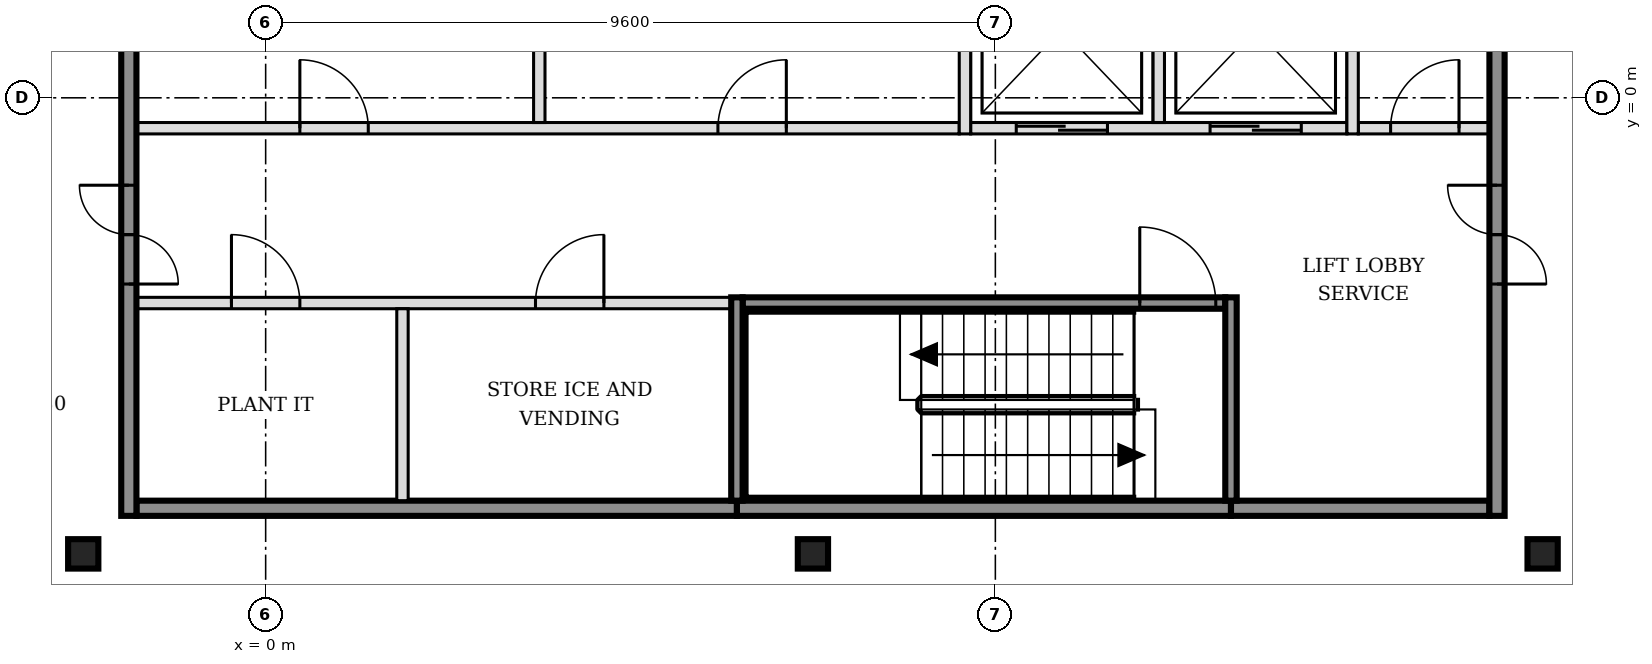
"""IFC4 building model, lengths in metres.
Left out: names, types, materials, properties, quantities, classifications, styles, units other than length and angle.
Written with IfcOpenShell. Run it as: python <this file> out.ifc"""

import sys

from ifc_helpers import new_model, si_unit, direction, frame, frame_2d, origin, origin_2d, place, context, subcontext, project, spatial, rectangle, i_section, extrude, element, fill, save


model = new_model("IFC4")
c1 = context("Model", 3, precision=1e-05, world=origin(), true_north=direction((0.0, 1.0)))
c2 = subcontext(c1, "Body", "Model", "MODEL_VIEW")
j1 = project(units=[si_unit("LENGTHUNIT", "METRE"), si_unit("PLANEANGLEUNIT", "RADIAN")], contexts=[c1])
p1 = place(None, origin())
s1 = spatial("IfcSite", under=j1, at=p1, CompositionType="ELEMENT")
p2 = place(p1, origin())
s2 = spatial("IfcBuilding", under=s1, at=p2, CompositionType="ELEMENT")
p3 = place(p2, frame((0.0, 0.0, 253.8)))
s3 = spatial("IfcBuildingStorey", under=s2, at=p3, CompositionType="ELEMENT", Elevation=253.8)
for number, where, z_axis, x_axis in (
    (1, (-2.4, -6.0, -0.15), (0.0, 0.0, 1.0), (1.0, 0.0, 0.0)),
    (2, (7.2, -6.0, -0.15), (0.0, 0.0, 1.0), (1.0, 0.0, 0.0)),
    (3, (16.8, -6.0, -0.15), (0.0, 0.0, 1.0), (1.0, 0.0, 0.0)),
):
    element("IfcColumn", number, at=place(p3, frame(where, z_axis=z_axis, x_axis=x_axis)), inside=s3, PredefinedType="COLUMN", context=c2, shape_type="SweptSolid", body=[
        extrude(i_section(OverallWidth=0.398, OverallDepth=0.387, WebThickness=0.021, FlangeThickness=0.033, FilletRadius=0.015, at=origin_2d()), origin(), (0.0, 0.0, 1.0), 3.6),
    ])
p4 = place(p3, frame((-1.7, -5.4, 0.0), z_axis=(0.0, 0.0, 1.0), x_axis=(1.0, 0.0, 0.0)))
e4 = element("IfcWall", 4, at=p4, inside=s3, PredefinedType="SOLIDWALL", context=c2, shape_type="SweptSolid", body=[
    extrude(rectangle(XDim=7.9, YDim=0.2, at=frame_2d((3.95, 0.0))), origin(), (0.0, 0.0, 1.0), 3.45),
])
p5 = place(p3, frame((6.2, -5.4, 0.0), z_axis=(0.0, 0.0, 1.0), x_axis=(1.0, 0.0, 0.0)))
e5 = element("IfcWall", 5, at=p5, inside=s3, PredefinedType="SOLIDWALL", context=c2, shape_type="SweptSolid", body=[
    extrude(rectangle(XDim=6.5, YDim=0.2, at=frame_2d((3.25, 0.0))), origin(), (0.0, 0.0, 1.0), 3.45),
])
p6 = place(p3, frame((12.7, -5.4, 0.0), z_axis=(0.0, 0.0, 1.0), x_axis=(1.0, 0.0, 0.0)))
e6 = element("IfcWall", 6, at=p6, inside=s3, PredefinedType="SOLIDWALL", context=c2, shape_type="SweptSolid", body=[
    extrude(rectangle(XDim=3.4, YDim=0.2, at=frame_2d((1.7, 0.0))), origin(), (0.0, 0.0, 1.0), 3.45),
])
p7 = place(p3, frame((-1.7, -2.7, 0.0), z_axis=(0.0, 0.0, 1.0), x_axis=(1.0, 0.0, 0.0)))
e7 = element("IfcWall", 7, at=p7, inside=s3, PredefinedType="PARTITIONING", context=c2, shape_type="SweptSolid", body=[
    extrude(rectangle(XDim=7.825, YDim=0.15, at=frame_2d((3.913, 0.0))), origin(), (0.0, 0.0, 1.0), 3.45),
])
p8 = place(p7, frame((1.25, 0.0, 0.0)))
e8 = element("IfcOpeningElement", 8, at=p8, cuts=e7, PredefinedType="OPENING", context=c2, shape_type="SweptSolid", body=[
    extrude(rectangle(XDim=0.9, YDim=2.1, at=frame_2d((0.45, 1.05))), frame((0.0, 0.085, 0.0), z_axis=(0.0, -1.0, 0.0), x_axis=(1.0, 0.0, 0.0)), (0.0, 0.0, 1.0), 0.17),
])
p9 = place(p7, frame((5.25, 0.0, 0.0)))
e9 = element("IfcOpeningElement", 9, at=p9, cuts=e7, PredefinedType="OPENING", context=c2, shape_type="SweptSolid", body=[
    extrude(rectangle(XDim=0.9, YDim=2.1, at=frame_2d((0.45, 1.05))), frame((0.0, 0.085, 0.0), z_axis=(0.0, -1.0, 0.0), x_axis=(1.0, 0.0, 0.0)), (0.0, 0.0, 1.0), 0.17),
])
p10 = place(p3, frame((6.275, -2.7, 0.0), z_axis=(0.0, 0.0, 1.0), x_axis=(1.0, 0.0, 0.0)))
e10 = element("IfcWall", 10, at=p10, inside=s3, PredefinedType="SOLIDWALL", context=c2, shape_type="SweptSolid", body=[
    extrude(rectangle(XDim=6.35, YDim=0.15, at=frame_2d((3.175, 0.0))), origin(), (0.0, 0.0, 1.0), 3.45),
])
p11 = place(p10, frame((5.225, 0.0, 0.0)))
e11 = element("IfcOpeningElement", 11, at=p11, cuts=e10, PredefinedType="OPENING", context=c2, shape_type="SweptSolid", body=[
    extrude(rectangle(XDim=1.0, YDim=2.1, at=frame_2d((0.5, 1.05))), frame((0.0, 0.085, 0.0), z_axis=(0.0, -1.0, 0.0), x_axis=(1.0, 0.0, 0.0)), (0.0, 0.0, 1.0), 0.17),
])
p12 = place(p3, frame((-1.7, -0.4, 0.0), z_axis=(0.0, 0.0, 1.0), x_axis=(1.0, 0.0, 0.0)))
e12 = element("IfcWall", 12, at=p12, inside=s3, PredefinedType="PARTITIONING", context=c2, shape_type="SweptSolid", body=[
    extrude(rectangle(XDim=10.825, YDim=0.15, at=frame_2d((5.413, 0.0))), origin(), (0.0, 0.0, 1.0), 3.45),
])
p13 = place(p12, frame((2.15, 0.0, 0.0)))
e13 = element("IfcOpeningElement", 13, at=p13, cuts=e12, PredefinedType="OPENING", context=c2, shape_type="SweptSolid", body=[
    extrude(rectangle(XDim=0.9, YDim=2.1, at=frame_2d((0.45, 1.05))), frame((0.0, 0.085, 0.0), z_axis=(0.0, -1.0, 0.0), x_axis=(1.0, 0.0, 0.0)), (0.0, 0.0, 1.0), 0.17),
])
p14 = place(p12, frame((7.65, 0.0, 0.0)))
e14 = element("IfcOpeningElement", 14, at=p14, cuts=e12, PredefinedType="OPENING", context=c2, shape_type="SweptSolid", body=[
    extrude(rectangle(XDim=0.9, YDim=2.1, at=frame_2d((0.45, 1.05))), frame((0.0, 0.085, 0.0), z_axis=(0.0, -1.0, 0.0), x_axis=(1.0, 0.0, 0.0)), (0.0, 0.0, 1.0), 0.17),
])
p15 = place(p3, frame((9.275, -0.4, 0.0), z_axis=(0.0, 0.0, 1.0), x_axis=(1.0, 0.0, 0.0)))
e15 = element("IfcWall", 15, at=p15, inside=s3, PredefinedType="SOLIDWALL", context=c2, shape_type="SweptSolid", body=[
    extrude(rectangle(XDim=4.95, YDim=0.15, at=frame_2d((2.475, 0.0))), origin(), (0.0, 0.0, 1.0), 3.45),
])
p16 = place(p15, frame((0.6, 0.0, 0.0)))
e16 = element("IfcOpeningElement", 16, at=p16, cuts=e15, PredefinedType="OPENING", context=c2, shape_type="SweptSolid", body=[
    extrude(rectangle(XDim=1.2, YDim=2.1, at=frame_2d((0.6, 1.05))), frame((0.0, 0.085, 0.0), z_axis=(0.0, -1.0, 0.0), x_axis=(1.0, 0.0, 0.0)), (0.0, 0.0, 1.0), 0.17),
])
p17 = place(p15, frame((3.15, 0.0, 0.0)))
e17 = element("IfcOpeningElement", 17, at=p17, cuts=e15, PredefinedType="OPENING", context=c2, shape_type="SweptSolid", body=[
    extrude(rectangle(XDim=1.2, YDim=2.1, at=frame_2d((0.6, 1.05))), frame((0.0, 0.085, 0.0), z_axis=(0.0, -1.0, 0.0), x_axis=(1.0, 0.0, 0.0)), (0.0, 0.0, 1.0), 0.17),
])
p18 = place(p3, frame((14.375, -0.4, 0.0), z_axis=(0.0, 0.0, 1.0), x_axis=(1.0, 0.0, 0.0)))
e18 = element("IfcWall", 18, at=p18, inside=s3, PredefinedType="PARTITIONING", context=c2, shape_type="SweptSolid", body=[
    extrude(rectangle(XDim=1.725, YDim=0.15, at=frame_2d((0.863, 0.0))), origin(), (0.0, 0.0, 1.0), 3.45),
])
p19 = place(p18, frame((0.425, 0.0, 0.0)))
e19 = element("IfcOpeningElement", 19, at=p19, cuts=e18, PredefinedType="OPENING", context=c2, shape_type="SweptSolid", body=[
    extrude(rectangle(XDim=0.9, YDim=2.1, at=frame_2d((0.45, 1.05))), frame((0.0, 0.085, 0.0), z_axis=(0.0, -1.0, 0.0), x_axis=(1.0, 0.0, 0.0)), (0.0, 0.0, 1.0), 0.17),
])
p20 = place(p3, frame((-1.8, -5.5, 0.0), z_axis=(0.0, 0.0, 1.0), x_axis=(0.0, 1.0, 0.0)))
e20 = element("IfcWall", 20, at=p20, inside=s3, PredefinedType="SOLIDWALL", context=c2, shape_type="SweptSolid", body=[
    extrude(rectangle(XDim=15.8, YDim=0.2, at=frame_2d((7.9, 0.0))), origin(), (0.0, 0.0, 1.0), 3.45),
])
p21 = place(p20, frame((3.05, 0.0, 0.0)))
e21 = element("IfcOpeningElement", 21, at=p21, cuts=e20, PredefinedType="OPENING", context=c2, shape_type="SweptSolid", body=[
    extrude(rectangle(XDim=1.3, YDim=2.1, at=frame_2d((0.65, 1.05))), frame((0.0, 0.11, 0.0), z_axis=(0.0, -1.0, 0.0), x_axis=(1.0, 0.0, 0.0)), (0.0, 0.0, 1.0), 0.22),
])
p22 = place(p20, frame((11.45, 0.0, 0.0)))
e22 = element("IfcOpeningElement", 22, at=p22, cuts=e20, PredefinedType="OPENING", context=c2, shape_type="SweptSolid", body=[
    extrude(rectangle(XDim=1.3, YDim=2.1, at=frame_2d((0.65, 1.05))), frame((0.0, 0.11, 0.0), z_axis=(0.0, -1.0, 0.0), x_axis=(1.0, 0.0, 0.0)), (0.0, 0.0, 1.0), 0.22),
])
p23 = place(p3, frame((1.8, -5.3, 0.0), z_axis=(0.0, 0.0, 1.0), x_axis=(0.0, 1.0, 0.0)))
e23 = element("IfcWall", 23, at=p23, inside=s3, PredefinedType="PARTITIONING", context=c2, shape_type="SweptSolid", body=[
    extrude(rectangle(XDim=2.525, YDim=0.15, at=frame_2d((1.263, 0.0))), origin(), (0.0, 0.0, 1.0), 3.45),
])
p24 = place(p3, frame((3.6, -0.325, 0.0), z_axis=(0.0, 0.0, 1.0), x_axis=(0.0, 1.0, 0.0)))
e24 = element("IfcWall", 24, at=p24, inside=s3, PredefinedType="PARTITIONING", context=c2, shape_type="SweptSolid", body=[
    extrude(rectangle(XDim=2.45, YDim=0.15, at=frame_2d((1.225, 0.0))), origin(), (0.0, 0.0, 1.0), 3.45),
])
p25 = place(p3, frame((6.2, -5.3, 0.0), z_axis=(0.0, 0.0, 1.0), x_axis=(0.0, 1.0, 0.0)))
e25 = element("IfcWall", 25, at=p25, inside=s3, PredefinedType="SOLIDWALL", context=c2, shape_type="SweptSolid", body=[
    extrude(rectangle(XDim=2.675, YDim=0.15, at=frame_2d((1.337, 0.0))), origin(), (0.0, 0.0, 1.0), 3.45),
])
p26 = place(p3, frame((9.2, -0.475, 0.0), z_axis=(0.0, 0.0, 1.0), x_axis=(0.0, 1.0, 0.0)))
e26 = element("IfcWall", 26, at=p26, inside=s3, PredefinedType="SOLIDWALL", context=c2, shape_type="SweptSolid", body=[
    extrude(rectangle(XDim=2.6, YDim=0.15, at=frame_2d((1.3, 0.0))), origin(), (0.0, 0.0, 1.0), 3.45),
])
p27 = place(p3, frame((11.75, -0.325, 0.0), z_axis=(0.0, 0.0, 1.0), x_axis=(0.0, 1.0, 0.0)))
e27 = element("IfcWall", 27, at=p27, inside=s3, PredefinedType="SOLIDWALL", context=c2, shape_type="SweptSolid", body=[
    extrude(rectangle(XDim=2.45, YDim=0.15, at=frame_2d((1.225, 0.0))), origin(), (0.0, 0.0, 1.0), 3.45),
])
p28 = place(p3, frame((12.7, -5.3, 0.0), z_axis=(0.0, 0.0, 1.0), x_axis=(0.0, 1.0, 0.0)))
e28 = element("IfcWall", 28, at=p28, inside=s3, PredefinedType="SOLIDWALL", context=c2, shape_type="SweptSolid", body=[
    extrude(rectangle(XDim=2.675, YDim=0.15, at=frame_2d((1.337, 0.0))), origin(), (0.0, 0.0, 1.0), 3.45),
])
p29 = place(p3, frame((14.3, -0.475, 0.0), z_axis=(0.0, 0.0, 1.0), x_axis=(0.0, 1.0, 0.0)))
e29 = element("IfcWall", 29, at=p29, inside=s3, PredefinedType="SOLIDWALL", context=c2, shape_type="SweptSolid", body=[
    extrude(rectangle(XDim=2.75, YDim=0.15, at=frame_2d((1.375, 0.0))), origin(), (0.0, 0.0, 1.0), 3.45),
])
p30 = place(p3, frame((16.2, -5.5, 0.0), z_axis=(0.0, 0.0, 1.0), x_axis=(0.0, 1.0, 0.0)))
e30 = element("IfcWall", 30, at=p30, inside=s3, PredefinedType="SOLIDWALL", context=c2, shape_type="SweptSolid", body=[
    extrude(rectangle(XDim=15.8, YDim=0.2, at=frame_2d((7.9, 0.0))), origin(), (0.0, 0.0, 1.0), 3.45),
])
p31 = place(p30, frame((3.05, 0.0, 0.0)))
e31 = element("IfcOpeningElement", 31, at=p31, cuts=e30, PredefinedType="OPENING", context=c2, shape_type="SweptSolid", body=[
    extrude(rectangle(XDim=1.3, YDim=2.1, at=frame_2d((0.65, 1.05))), frame((0.0, 0.11, 0.0), z_axis=(0.0, -1.0, 0.0), x_axis=(1.0, 0.0, 0.0)), (0.0, 0.0, 1.0), 0.22),
])
p32 = place(p30, frame((11.45, 0.0, 0.0)))
e32 = element("IfcOpeningElement", 32, at=p32, cuts=e30, PredefinedType="OPENING", context=c2, shape_type="SweptSolid", body=[
    extrude(rectangle(XDim=1.3, YDim=2.1, at=frame_2d((0.65, 1.05))), frame((0.0, 0.11, 0.0), z_axis=(0.0, -1.0, 0.0), x_axis=(1.0, 0.0, 0.0)), (0.0, 0.0, 1.0), 0.22),
])
p33 = place(p16, origin())
e33 = element("IfcDoor", 33, at=p33, inside=s3, OperationType="DOUBLE_DOOR_SLIDING", PredefinedType="DOOR", context=c2, shape_type="SweptSolid", body=[
    extrude(rectangle(XDim=1.2, YDim=2.1, at=frame_2d((0.6, 1.05))), frame((0.0, 0.025, 0.0), z_axis=(0.0, -1.0, 0.0), x_axis=(1.0, 0.0, 0.0)), (0.0, 0.0, 1.0), 0.05),
])
fill(e16, e33)
p34 = place(p17, origin())
e34 = element("IfcDoor", 34, at=p34, inside=s3, OperationType="DOUBLE_DOOR_SLIDING", PredefinedType="DOOR", context=c2, shape_type="SweptSolid", body=[
    extrude(rectangle(XDim=1.2, YDim=2.1, at=frame_2d((0.6, 1.05))), frame((0.0, 0.025, 0.0), z_axis=(0.0, -1.0, 0.0), x_axis=(1.0, 0.0, 0.0)), (0.0, 0.0, 1.0), 0.05),
])
fill(e17, e34)
p35 = place(p11, origin())
e35 = element("IfcDoor", 35, at=p35, inside=s3, OperationType="SINGLE_SWING_LEFT", PredefinedType="DOOR", context=c2, shape_type="SweptSolid", body=[
    extrude(rectangle(XDim=1.0, YDim=2.1, at=frame_2d((0.5, 1.05))), frame((0.0, 0.025, 0.0), z_axis=(0.0, -1.0, 0.0), x_axis=(1.0, 0.0, 0.0)), (0.0, 0.0, 1.0), 0.05),
])
fill(e11, e35)
p36 = place(p21, origin())
e36 = element("IfcDoor", 36, at=p36, inside=s3, OperationType="DOUBLE_DOOR_SINGLE_SWING", PredefinedType="DOOR", context=c2, shape_type="SweptSolid", body=[
    extrude(rectangle(XDim=1.3, YDim=2.1, at=frame_2d((0.65, 1.05))), frame((0.0, 0.025, 0.0), z_axis=(0.0, -1.0, 0.0), x_axis=(1.0, 0.0, 0.0)), (0.0, 0.0, 1.0), 0.05),
])
fill(e21, e36)
p37 = place(p31, origin())
e37 = element("IfcDoor", 37, at=p37, inside=s3, OperationType="DOUBLE_DOOR_SINGLE_SWING", PredefinedType="DOOR", context=c2, shape_type="SweptSolid", body=[
    extrude(rectangle(XDim=1.3, YDim=2.1, at=frame_2d((0.65, 1.05))), frame((0.0, 0.025, 0.0), z_axis=(0.0, -1.0, 0.0), x_axis=(1.0, 0.0, 0.0)), (0.0, 0.0, 1.0), 0.05),
])
fill(e31, e37)
p38 = place(p19, origin())
e38 = element("IfcDoor", 38, at=p38, inside=s3, OperationType="SINGLE_SWING_RIGHT", PredefinedType="DOOR", context=c2, shape_type="SweptSolid", body=[
    extrude(rectangle(XDim=0.9, YDim=2.1, at=frame_2d((0.45, 1.05))), frame((0.0, 0.025, 0.0), z_axis=(0.0, -1.0, 0.0), x_axis=(1.0, 0.0, 0.0)), (0.0, 0.0, 1.0), 0.05),
])
fill(e19, e38)
p39 = place(p8, origin())
e39 = element("IfcDoor", 39, at=p39, inside=s3, OperationType="SINGLE_SWING_LEFT", PredefinedType="DOOR", context=c2, shape_type="SweptSolid", body=[
    extrude(rectangle(XDim=0.9, YDim=2.1, at=frame_2d((0.45, 1.05))), frame((0.0, 0.025, 0.0), z_axis=(0.0, -1.0, 0.0), x_axis=(1.0, 0.0, 0.0)), (0.0, 0.0, 1.0), 0.05),
])
fill(e8, e39)
p40 = place(p9, origin())
e40 = element("IfcDoor", 40, at=p40, inside=s3, OperationType="SINGLE_SWING_RIGHT", PredefinedType="DOOR", context=c2, shape_type="SweptSolid", body=[
    extrude(rectangle(XDim=0.9, YDim=2.1, at=frame_2d((0.45, 1.05))), frame((0.0, 0.025, 0.0), z_axis=(0.0, -1.0, 0.0), x_axis=(1.0, 0.0, 0.0)), (0.0, 0.0, 1.0), 0.05),
])
fill(e9, e40)
p41 = place(p13, origin())
e41 = element("IfcDoor", 41, at=p41, inside=s3, OperationType="SINGLE_SWING_LEFT", PredefinedType="DOOR", context=c2, shape_type="SweptSolid", body=[
    extrude(rectangle(XDim=0.9, YDim=2.1, at=frame_2d((0.45, 1.05))), frame((0.0, 0.025, 0.0), z_axis=(0.0, -1.0, 0.0), x_axis=(1.0, 0.0, 0.0)), (0.0, 0.0, 1.0), 0.05),
])
fill(e13, e41)
p42 = place(p14, origin())
e42 = element("IfcDoor", 42, at=p42, inside=s3, OperationType="SINGLE_SWING_RIGHT", PredefinedType="DOOR", context=c2, shape_type="SweptSolid", body=[
    extrude(rectangle(XDim=0.9, YDim=2.1, at=frame_2d((0.45, 1.05))), frame((0.0, 0.025, 0.0), z_axis=(0.0, -1.0, 0.0), x_axis=(1.0, 0.0, 0.0)), (0.0, 0.0, 1.0), 0.05),
])
fill(e14, e42)
save(model, sys.argv[1])
